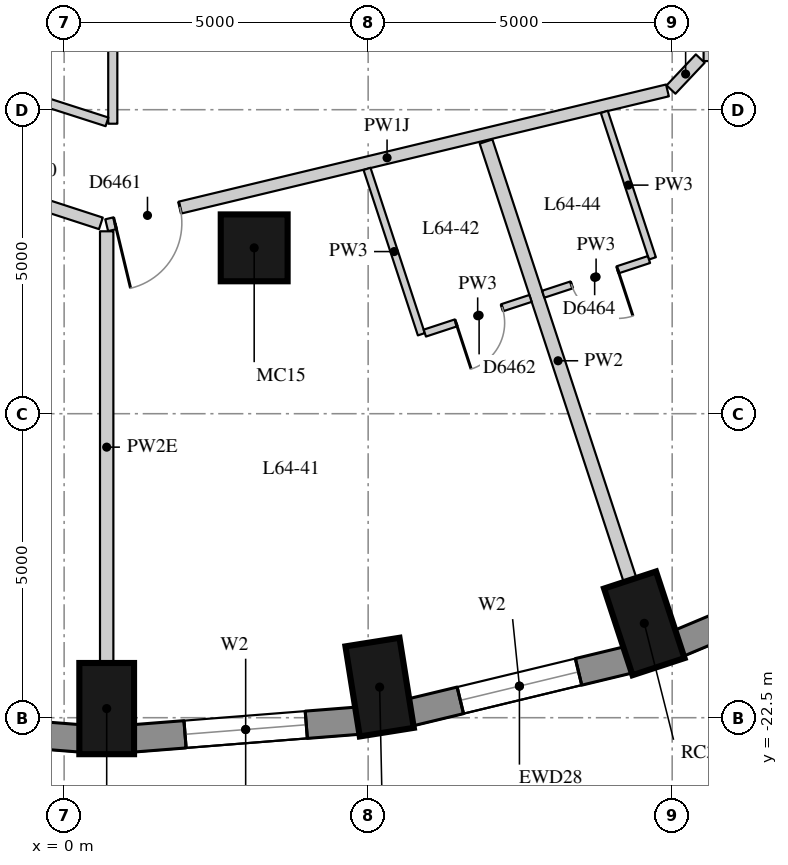
"""IFC4 building model, lengths in metres.
Left out: names, types, materials, properties, quantities, classifications, styles, units other than length and angle.
Written with IfcOpenShell. Run it as: python <this file> out.ifc"""

import sys

from ifc_helpers import new_model, si_unit, direction, frame, frame_2d, origin, origin_2d, place, context, subcontext, project, spatial, rectangle, extrude, element, fill, save


model = new_model("IFC4")
c1 = context("Model", 3, precision=1e-05, world=origin(), true_north=direction((0.0, 1.0)))
c2 = subcontext(c1, "Body", "Model", "MODEL_VIEW")
j1 = project(units=[si_unit("LENGTHUNIT", "METRE"), si_unit("PLANEANGLEUNIT", "RADIAN")], contexts=[c1])
p1 = place(None, origin())
s1 = spatial("IfcSite", under=j1, at=p1, CompositionType="ELEMENT")
p2 = place(p1, origin())
s2 = spatial("IfcBuilding", under=s1, at=p2, CompositionType="ELEMENT")
p3 = place(p2, frame((0.0, 0.0, 225.5)))
s3 = spatial("IfcBuildingStorey", under=s2, at=p3, CompositionType="ELEMENT", Elevation=225.5)
for number, where, z_axis, x_axis in (
    (1, (0.7, -22.35, 0.0), (0.0, 0.0, 1.0), (0.0, -1.0, 0.0)),
    (2, (5.189, -21.997, 0.0), (0.0, 0.0, 1.0), (0.157, -0.988, 0.0)),
    (3, (9.541, -20.948, 0.0), (0.0, 0.0, 1.0), (0.312, -0.95, 0.0)),
):
    element("IfcColumn", number, at=place(p3, frame(where, z_axis=z_axis, x_axis=x_axis)), inside=s3, PredefinedType="COLUMN", context=c2, shape_type="SweptSolid", body=[
        extrude(rectangle(XDim=1.5, YDim=0.9, at=origin_2d()), origin(), (0.0, 0.0, 1.0), 3.3),
    ])
p4 = place(p3, frame((3.126, -14.772, 0.0), z_axis=(0.0, 0.0, 1.0), x_axis=(1.0, 0.0, 0.0)))
e4 = element("IfcColumn", 4, at=p4, inside=s3, PredefinedType="COLUMN", context=c2, shape_type="SweptSolid", body=[
    extrude(rectangle(XDim=1.1, YDim=1.1, at=origin_2d()), origin(), (0.0, 0.0, 1.0), 3.3),
])
p5 = place(p3, frame((-3.441, -22.548, 0.0), z_axis=(0.0, 0.0, 1.0), x_axis=(0.996913971077, -0.078501810629, 0.0)))
e5 = element("IfcWall", 5, at=p5, inside=s3, PredefinedType="SOLIDWALL", context=c2, shape_type="SweptSolid", body=[
    extrude(rectangle(XDim=3.723, YDim=0.45, at=frame_2d((1.861, 0.0))), origin(), (0.0, 0.0, 1.0), 2.85),
])
p6 = place(p5, frame((0.861, 0.0, 0.4)))
e6 = element("IfcOpeningElement", 6, at=p6, cuts=e5, PredefinedType="OPENING", context=c2, shape_type="SweptSolid", body=[
    extrude(rectangle(XDim=2.0, YDim=1.75, at=frame_2d((1.0, 0.875))), frame((0.0, 0.235, 0.0), z_axis=(0.0, -1.0, 0.0), x_axis=(1.0, 0.0, 0.0)), (0.0, 0.0, 1.0), 0.47),
])
p7 = place(p3, frame((1.13, -22.841, 0.0), z_axis=(0.0, 0.0, 1.0), x_axis=(0.996913566885, 0.078506943392, 0.0)))
e7 = element("IfcWall", 7, at=p7, inside=s3, PredefinedType="SOLIDWALL", context=c2, shape_type="SweptSolid", body=[
    extrude(rectangle(XDim=3.722, YDim=0.45, at=frame_2d((1.861, 0.0))), origin(), (0.0, 0.0, 1.0), 2.85),
])
p8 = place(p7, frame((0.861, 0.0, 0.4)))
e8 = element("IfcOpeningElement", 8, at=p8, cuts=e7, PredefinedType="OPENING", context=c2, shape_type="SweptSolid", body=[
    extrude(rectangle(XDim=2.0, YDim=1.75, at=frame_2d((1.0, 0.875))), frame((0.0, 0.235, 0.0), z_axis=(0.0, -1.0, 0.0), x_axis=(1.0, 0.0, 0.0)), (0.0, 0.0, 1.0), 0.47),
])
p9 = place(p3, frame((5.691, -22.414, 0.0), z_axis=(0.0, 0.0, 1.0), x_axis=(0.9721584944, 0.234324266275, 0.0)))
e9 = element("IfcWall", 9, at=p9, inside=s3, PredefinedType="SOLIDWALL", context=c2, shape_type="SweptSolid", body=[
    extrude(rectangle(XDim=3.698, YDim=0.45, at=frame_2d((1.849, 0.0))), origin(), (0.0, 0.0, 1.0), 2.85),
])
p10 = place(p9, frame((0.849, 0.0, 0.4)))
e10 = element("IfcOpeningElement", 10, at=p10, cuts=e9, PredefinedType="OPENING", context=c2, shape_type="SweptSolid", body=[
    extrude(rectangle(XDim=2.0, YDim=1.75, at=frame_2d((1.0, 0.875))), frame((0.0, 0.235, 0.0), z_axis=(0.0, -1.0, 0.0), x_axis=(1.0, 0.0, 0.0)), (0.0, 0.0, 1.0), 0.47),
])
p11 = place(p3, frame((10.103, -21.279, 0.0), z_axis=(0.0, 0.0, 1.0), x_axis=(0.922168222612, 0.386789050006, 0.0)))
e11 = element("IfcWall", 11, at=p11, inside=s3, PredefinedType="SOLIDWALL", context=c2, shape_type="SweptSolid", body=[
    extrude(rectangle(XDim=3.651, YDim=0.45, at=frame_2d((1.825, 0.0))), origin(), (0.0, 0.0, 1.0), 2.85),
])
p12 = place(p11, frame((0.825, 0.0, 0.4)))
e12 = element("IfcOpeningElement", 12, at=p12, cuts=e11, PredefinedType="OPENING", context=c2, shape_type="SweptSolid", body=[
    extrude(rectangle(XDim=2.0, YDim=1.75, at=frame_2d((1.0, 0.875))), frame((0.0, 0.235, 0.0), z_axis=(0.0, -1.0, 0.0), x_axis=(1.0, 0.0, 0.0)), (0.0, 0.0, 1.0), 0.47),
])
p13 = place(p3, frame((17.5, -11.6, 0.0), z_axis=(0.0, 0.0, 1.0), x_axis=(-1.0, 0.0, 0.0)))
e13 = element("IfcWall", 13, at=p13, inside=s3, PredefinedType="PARTITIONING", context=c2, shape_type="SweptSolid", body=[
    extrude(rectangle(XDim=6.983, YDim=0.2, at=frame_2d((3.492, 0.0))), origin(), (0.0, 0.0, 1.0), 2.85),
])
p14 = place(p13, frame((5.743, 0.0, 0.0)))
e14 = element("IfcOpeningElement", 14, at=p14, cuts=e13, PredefinedType="OPENING", context=c2, shape_type="SweptSolid", body=[
    extrude(rectangle(XDim=1.1, YDim=2.1, at=frame_2d((0.55, 1.05))), frame((0.0, 0.11, 0.0), z_axis=(0.0, -1.0, 0.0), x_axis=(1.0, 0.0, 0.0)), (0.0, 0.0, 1.0), 0.22),
])
p15 = place(p13, frame((1.208, 0.0, 0.0)))
e15 = element("IfcOpeningElement", 15, at=p15, cuts=e13, PredefinedType="OPENING", context=c2, shape_type="SweptSolid", body=[
    extrude(rectangle(XDim=1.8, YDim=2.1, at=frame_2d((0.9, 1.05))), frame((0.0, 0.11, 0.0), z_axis=(0.0, -1.0, 0.0), x_axis=(1.0, 0.0, 0.0)), (0.0, 0.0, 1.0), 0.22),
])
p16 = place(p3, frame((10.462, -11.659, 0.0), z_axis=(0.0, 0.0, 1.0), x_axis=(-0.686265612426, -0.727351021998, 0.0)))
e16 = element("IfcWall", 16, at=p16, inside=s3, PredefinedType="PARTITIONING", context=c2, shape_type="SweptSolid", body=[
    extrude(rectangle(XDim=0.701, YDim=0.2, at=frame_2d((0.351, 0.0))), origin(), (0.0, 0.0, 1.0), 2.85),
])
p17 = place(p3, frame((9.922, -12.183, 0.0), z_axis=(0.0, 0.0, 1.0), x_axis=(-0.972292362394, -0.233768180104, 0.0)))
e17 = element("IfcWall", 17, at=p17, inside=s3, PredefinedType="PARTITIONING", context=c2, shape_type="SweptSolid", body=[
    extrude(rectangle(XDim=9.485, YDim=0.2, at=frame_2d((4.742, 0.0))), origin(), (0.0, 0.0, 1.0), 2.25),
])
p18 = place(p17, frame((8.245, 0.0, 0.0)))
e18 = element("IfcOpeningElement", 18, at=p18, cuts=e17, PredefinedType="OPENING", context=c2, shape_type="SweptSolid", body=[
    extrude(rectangle(XDim=1.1, YDim=2.1, at=frame_2d((0.55, 1.05))), frame((0.0, 0.11, 0.0), z_axis=(0.0, -1.0, 0.0), x_axis=(1.0, 0.0, 0.0)), (0.0, 0.0, 1.0), 0.22),
])
p19 = place(p3, frame((0.605, -14.369, 0.0), z_axis=(0.0, 0.0, 1.0), x_axis=(-0.950994614205, 0.309207444529, 0.0)))
e19 = element("IfcWall", 19, at=p19, inside=s3, PredefinedType="PARTITIONING", context=c2, shape_type="SweptSolid", body=[
    extrude(rectangle(XDim=8.733, YDim=0.2, at=frame_2d((4.366, 0.0))), origin(), (0.0, 0.0, 1.0), 2.85),
])
p20 = place(p19, frame((7.04, 0.0, 0.0)))
e20 = element("IfcOpeningElement", 20, at=p20, cuts=e19, PredefinedType="OPENING", context=c2, shape_type="SweptSolid", body=[
    extrude(rectangle(XDim=0.9, YDim=2.1, at=frame_2d((0.45, 1.05))), frame((0.0, 0.11, 0.0), z_axis=(0.0, -1.0, 0.0), x_axis=(1.0, 0.0, 0.0)), (0.0, 0.0, 1.0), 0.22),
])
p21 = place(p19, frame((4.375, 0.0, 0.0)))
e21 = element("IfcOpeningElement", 21, at=p21, cuts=e19, PredefinedType="OPENING", context=c2, shape_type="SweptSolid", body=[
    extrude(rectangle(XDim=0.9, YDim=2.1, at=frame_2d((0.45, 1.05))), frame((0.0, 0.11, 0.0), z_axis=(0.0, -1.0, 0.0), x_axis=(1.0, 0.0, 0.0)), (0.0, 0.0, 1.0), 0.22),
])
p22 = place(p19, frame((1.145, 0.0, 0.0)))
e22 = element("IfcOpeningElement", 22, at=p22, cuts=e19, PredefinedType="OPENING", context=c2, shape_type="SweptSolid", body=[
    extrude(rectangle(XDim=0.9, YDim=2.1, at=frame_2d((0.45, 1.05))), frame((0.0, 0.11, 0.0), z_axis=(0.0, -1.0, 0.0), x_axis=(1.0, 0.0, 0.0)), (0.0, 0.0, 1.0), 0.22),
])
p23 = place(p3, frame((0.8, -9.23, 0.0), z_axis=(0.0, 0.0, 1.0), x_axis=(0.0, -1.0, 0.0)))
e23 = element("IfcWall", 23, at=p23, inside=s3, PredefinedType="PARTITIONING", context=c2, shape_type="SweptSolid", body=[
    extrude(rectangle(XDim=3.5, YDim=0.15, at=frame_2d((1.75, 0.0))), origin(), (0.0, 0.0, 1.0), 2.85),
])
p24 = place(p3, frame((0.705, -12.7, 0.0), z_axis=(0.0, 0.0, 1.0), x_axis=(-0.952035530576, 0.305987497327, 0.0)))
e24 = element("IfcWall", 24, at=p24, inside=s3, PredefinedType="PARTITIONING", context=c2, shape_type="SweptSolid", body=[
    extrude(rectangle(XDim=5.467, YDim=0.15, at=frame_2d((2.733, 0.0))), origin(), (0.0, 0.0, 1.0), 2.85),
])
p25 = place(p3, frame((0.7, -21.6, 0.0), z_axis=(0.0, 0.0, 1.0), x_axis=(0.0, 1.0, 0.0)))
e25 = element("IfcWall", 25, at=p25, inside=s3, PredefinedType="PARTITIONING", context=c2, shape_type="SweptSolid", body=[
    extrude(rectangle(XDim=7.1, YDim=0.22, at=frame_2d((3.55, 0.0))), origin(), (0.0, 0.0, 1.0), 2.4),
])
p26 = place(p3, frame((9.307, -20.235, 0.0), z_axis=(0.0, 0.0, 1.0), x_axis=(-0.311979110549, 0.950088961404, 0.0)))
e26 = element("IfcWall", 26, at=p26, inside=s3, PredefinedType="PARTITIONING", context=c2, shape_type="SweptSolid", body=[
    extrude(rectangle(XDim=7.591, YDim=0.22, at=frame_2d((3.795, 0.0))), origin(), (0.0, 0.0, 1.0), 2.85),
])
p27 = place(p3, frame((4.981, -13.473, 0.0), z_axis=(0.0, 0.0, 1.0), x_axis=(0.312029038347, -0.950072565243, 0.0)))
e27 = element("IfcWall", 27, at=p27, inside=s3, PredefinedType="PARTITIONING", context=c2, shape_type="SweptSolid", body=[
    extrude(rectangle(XDim=2.863, YDim=0.12, at=frame_2d((1.431, 0.0))), origin(), (0.0, 0.0, 1.0), 2.85),
])
p28 = place(p3, frame((8.884, -12.535, 0.0), z_axis=(0.0, 0.0, 1.0), x_axis=(0.312037873477, -0.950069663507, 0.0)))
e28 = element("IfcWall", 28, at=p28, inside=s3, PredefinedType="PARTITIONING", context=c2, shape_type="SweptSolid", body=[
    extrude(rectangle(XDim=2.537, YDim=0.12, at=frame_2d((1.268, 0.0))), origin(), (0.0, 0.0, 1.0), 2.85),
])
p29 = place(p3, frame((5.932, -16.174, 0.0), z_axis=(0.0, 0.0, 1.0), x_axis=(0.950140787885, 0.311821235962, 0.0)))
e29 = element("IfcWall", 29, at=p29, inside=s3, PredefinedType="PARTITIONING", context=c2, shape_type="SweptSolid", body=[
    extrude(rectangle(XDim=1.83, YDim=0.12, at=frame_2d((0.915, 0.0))), origin(), (0.0, 0.0, 1.0), 2.85),
])
p30 = place(p29, frame((0.54, 0.0, 0.0)))
e30 = element("IfcOpeningElement", 30, at=p30, cuts=e29, PredefinedType="OPENING", context=c2, shape_type="SweptSolid", body=[
    extrude(rectangle(XDim=0.8, YDim=2.1, at=frame_2d((0.4, 1.05))), frame((0.0, 0.07, 0.0), z_axis=(0.0, -1.0, 0.0), x_axis=(1.0, 0.0, 0.0)), (0.0, 0.0, 1.0), 0.14),
])
p31 = place(p3, frame((9.618, -14.964, 0.0), z_axis=(0.0, 0.0, 1.0), x_axis=(-0.950140787885, -0.311821235962, 0.0)))
e31 = element("IfcWall", 31, at=p31, inside=s3, PredefinedType="PARTITIONING", context=c2, shape_type="SweptSolid", body=[
    extrude(rectangle(XDim=1.83, YDim=0.12, at=frame_2d((0.915, 0.0))), origin(), (0.0, 0.0, 1.0), 2.85),
])
p32 = place(p31, frame((0.54, 0.0, 0.0)))
e32 = element("IfcOpeningElement", 32, at=p32, cuts=e31, PredefinedType="OPENING", context=c2, shape_type="SweptSolid", body=[
    extrude(rectangle(XDim=0.8, YDim=2.1, at=frame_2d((0.4, 1.05))), frame((0.0, 0.07, 0.0), z_axis=(0.0, -1.0, 0.0), x_axis=(1.0, 0.0, 0.0)), (0.0, 0.0, 1.0), 0.14),
])
p33 = place(p8, origin())
e33 = element("IfcWindow", 33, at=p33, inside=s3, PartitioningType="SINGLE_PANEL", PredefinedType="WINDOW", context=c2, shape_type="SweptSolid", body=[
    extrude(rectangle(XDim=2.0, YDim=1.75, at=frame_2d((1.0, 0.875))), frame((0.0, 0.035, 0.0), z_axis=(0.0, -1.0, 0.0), x_axis=(1.0, 0.0, 0.0)), (0.0, 0.0, 1.0), 0.06),
])
fill(e8, e33)
p34 = place(p10, origin())
e34 = element("IfcWindow", 34, at=p34, inside=s3, PartitioningType="SINGLE_PANEL", PredefinedType="WINDOW", context=c2, shape_type="SweptSolid", body=[
    extrude(rectangle(XDim=2.0, YDim=1.75, at=frame_2d((1.0, 0.875))), frame((0.0, 0.035, 0.0), z_axis=(0.0, -1.0, 0.0), x_axis=(1.0, 0.0, 0.0)), (0.0, 0.0, 1.0), 0.06),
])
fill(e10, e34)
p35 = place(p18, origin())
e35 = element("IfcDoor", 35, at=p35, inside=s3, OperationType="SINGLE_SWING_RIGHT", PredefinedType="DOOR", context=c2, shape_type="SweptSolid", body=[
    extrude(rectangle(XDim=1.1, YDim=2.1, at=frame_2d((0.55, 1.05))), frame((0.0, 0.025, 0.0), z_axis=(0.0, -1.0, 0.0), x_axis=(1.0, 0.0, 0.0)), (0.0, 0.0, 1.0), 0.05),
])
fill(e18, e35)
p36 = place(p30, origin())
e36 = element("IfcDoor", 36, at=p36, inside=s3, OperationType="SINGLE_SWING_RIGHT", PredefinedType="DOOR", context=c2, shape_type="SweptSolid", body=[
    extrude(rectangle(XDim=0.8, YDim=2.1, at=frame_2d((0.4, 1.05))), frame((0.0, 0.025, 0.0), z_axis=(0.0, -1.0, 0.0), x_axis=(1.0, 0.0, 0.0)), (0.0, 0.0, 1.0), 0.05),
])
fill(e30, e36)
p37 = place(p32, origin())
e37 = element("IfcDoor", 37, at=p37, inside=s3, OperationType="SINGLE_SWING_LEFT", PredefinedType="DOOR", context=c2, shape_type="SweptSolid", body=[
    extrude(rectangle(XDim=0.8, YDim=2.1, at=frame_2d((0.4, 1.05))), frame((0.0, 0.025, 0.0), z_axis=(0.0, -1.0, 0.0), x_axis=(1.0, 0.0, 0.0)), (0.0, 0.0, 1.0), 0.05),
])
fill(e32, e37)
save(model, sys.argv[1])
